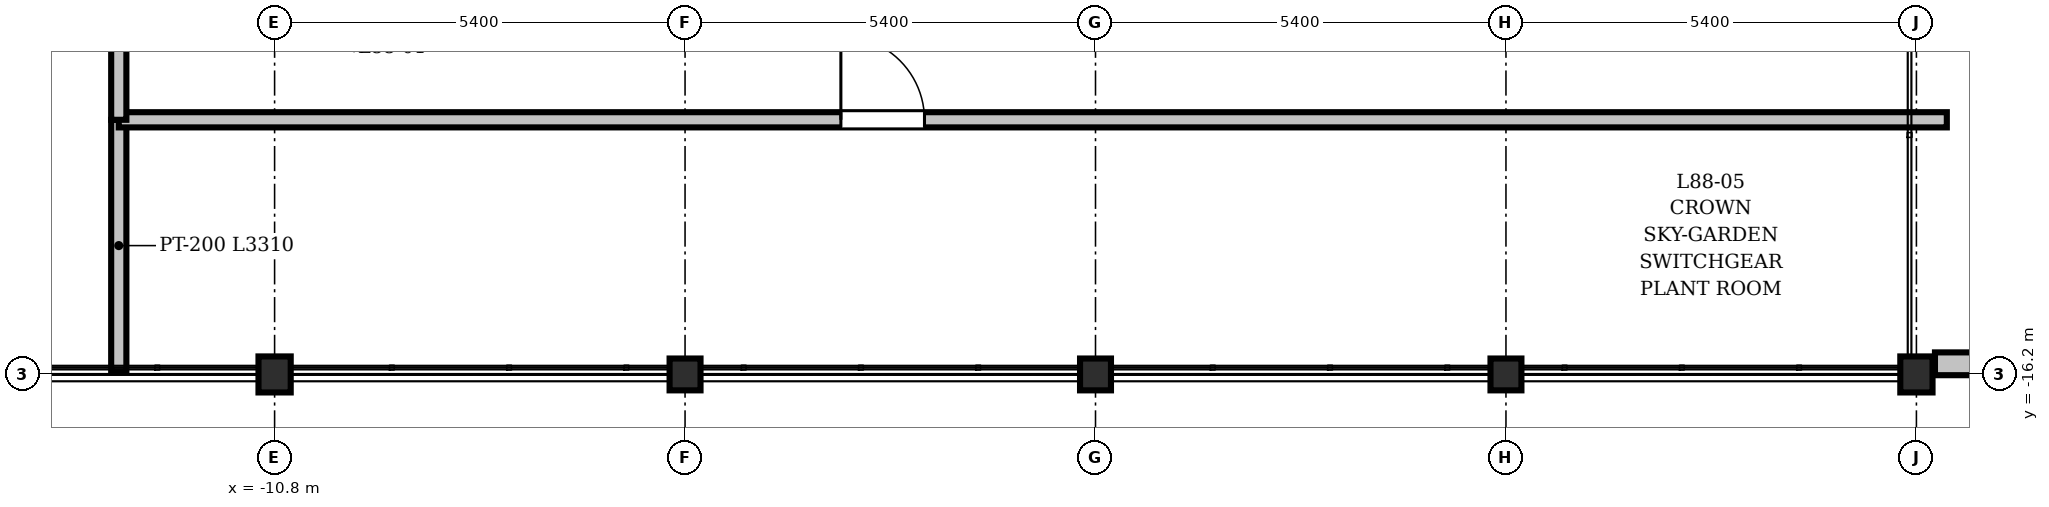
"""IFC4 building model, lengths in metres.
Left out: names, types, materials, properties, quantities, classifications, styles, units other than length and angle.
Written with IfcOpenShell. Run it as: python <this file> out.ifc"""

import sys

from ifc_helpers import new_model, si_unit, direction, frame, frame_2d, origin, origin_2d, place, context, subcontext, project, spatial, rectangle, i_section, extrude, element, fill, save


model = new_model("IFC4")
c1 = context("Model", 3, precision=1e-05, world=origin(), true_north=direction((0.0, 1.0)))
c2 = subcontext(c1, "Body", "Model", "MODEL_VIEW")
j1 = project(units=[si_unit("LENGTHUNIT", "METRE"), si_unit("PLANEANGLEUNIT", "RADIAN")], contexts=[c1])
p1 = place(None, origin())
s1 = spatial("IfcSite", under=j1, at=p1, CompositionType="ELEMENT")
p2 = place(p1, origin())
s2 = spatial("IfcBuilding", under=s1, at=p2, CompositionType="ELEMENT")
p3 = place(p2, frame((0.0, 0.0, 337.5)))
s3 = spatial("IfcBuildingStorey", under=s2, at=p3, CompositionType="ELEMENT", Elevation=337.5)
p4 = place(p3, frame((-10.8, -16.2, 0.0), z_axis=(0.0, 0.0, 1.0), x_axis=(1.0, 0.0, 0.0)))
e1 = element("IfcColumn", 1, at=p4, inside=s3, PredefinedType="COLUMN", context=c2, shape_type="SweptSolid", body=[
    extrude(i_section(OverallWidth=0.424, OverallDepth=0.474, WebThickness=0.043, FlangeThickness=0.065, at=origin_2d()), origin(), (0.0, 0.0, 1.0), 4.5),
])
for number, where, z_axis, x_axis in (
    (2, (-5.4, -16.2, 0.0), (0.0, 0.0, 1.0), (1.0, 0.0, 0.0)),
    (3, (0.0, -16.2, 0.0), (0.0, 0.0, 1.0), (1.0, 0.0, 0.0)),
    (4, (5.4, -16.2, 0.0), (0.0, 0.0, 1.0), (1.0, 0.0, 0.0)),
):
    element("IfcColumn", number, at=place(p3, frame(where, z_axis=z_axis, x_axis=x_axis)), inside=s3, PredefinedType="COLUMN", context=c2, shape_type="SweptSolid", body=[
        extrude(i_section(OverallWidth=0.407, OverallDepth=0.419, WebThickness=0.031, FlangeThickness=0.049, at=origin_2d()), origin(), (0.0, 0.0, 1.0), 4.5),
    ])
p5 = place(p3, frame((10.8, -16.2, 0.0), z_axis=(0.0, 0.0, 1.0), x_axis=(1.0, 0.0, 0.0)))
e5 = element("IfcColumn", 5, at=p5, inside=s3, PredefinedType="COLUMN", context=c2, shape_type="SweptSolid", body=[
    extrude(i_section(OverallWidth=0.424, OverallDepth=0.474, WebThickness=0.043, FlangeThickness=0.065, at=origin_2d()), origin(), (0.0, 0.0, 1.0), 4.5),
])
p6 = place(p3, frame((11.044, -16.06, 0.0), z_axis=(0.0, 0.0, 1.0), x_axis=(1.0, 0.0, 0.0)))
e6 = element("IfcWall", 6, at=p6, inside=s3, PredefinedType="STANDARD", context=c2, shape_type="SweptSolid", body=[
    extrude(rectangle(XDim=3.916, YDim=0.3, at=frame_2d((1.958, 0.0))), origin(), (0.0, 0.0, 1.0), 3.507),
])
p7 = place(p6, frame((1.433, 0.0, 0.75)))
e7 = element("IfcOpeningElement", 7, at=p7, cuts=e6, PredefinedType="OPENING", context=c2, shape_type="SweptSolid", body=[
    extrude(rectangle(XDim=1.05, YDim=1.5, at=frame_2d((0.525, 0.75))), frame((0.0, 0.16, 0.0), z_axis=(0.0, -1.0, 0.0), x_axis=(1.0, 0.0, 0.0)), (0.0, 0.0, 1.0), 0.32),
])
p8 = place(p3, frame((-12.85, -16.16, 0.0), z_axis=(0.0, 0.0, 1.0), x_axis=(0.0, 1.0, 0.0)))
e8 = element("IfcWall", 8, at=p8, inside=s3, PredefinedType="PARTITIONING", context=c2, shape_type="SweptSolid", body=[
    extrude(rectangle(XDim=3.31, YDim=0.2, at=frame_2d((1.655, 0.0))), origin(), (0.0, 0.0, 1.0), 3.507),
])
p9 = place(p3, frame((-12.85, -12.85, 0.0), z_axis=(0.0, 0.0, 1.0), x_axis=(1.0, 0.0, 0.0)))
e9 = element("IfcWall", 9, at=p9, inside=s3, PredefinedType="PARTITIONING", context=c2, shape_type="SweptSolid", body=[
    extrude(rectangle(XDim=24.05, YDim=0.2, at=frame_2d((12.025, 0.0))), origin(), (0.0, 0.0, 1.0), 3.507),
])
p10 = place(p9, frame((9.5, 0.0, 0.0)))
e10 = element("IfcOpeningElement", 10, at=p10, cuts=e9, PredefinedType="OPENING", context=c2, shape_type="SweptSolid", body=[
    extrude(rectangle(XDim=1.1, YDim=2.1, at=frame_2d((0.55, 1.05))), frame((0.0, 0.11, 0.0), z_axis=(0.0, -1.0, 0.0), x_axis=(1.0, 0.0, 0.0)), (0.0, 0.0, 1.0), 0.22),
])
p11 = place(p3, frame((-12.85, -12.85, 0.0), z_axis=(0.0, 0.0, 1.0), x_axis=(0.0, 1.0, 0.0)))
e11 = element("IfcWall", 11, at=p11, inside=s3, PredefinedType="PARTITIONING", context=c2, shape_type="SweptSolid", body=[
    extrude(rectangle(XDim=25.7, YDim=0.2, at=frame_2d((12.85, 0.0))), origin(), (0.0, 0.0, 1.0), 3.663),
])
p12 = place(p11, frame((16.5, 0.0, 0.0)))
e12 = element("IfcOpeningElement", 12, at=p12, cuts=e11, PredefinedType="OPENING", context=c2, shape_type="SweptSolid", body=[
    extrude(rectangle(XDim=1.1, YDim=2.1, at=frame_2d((0.55, 1.05))), frame((0.0, 0.11, 0.0), z_axis=(0.0, -1.0, 0.0), x_axis=(1.0, 0.0, 0.0)), (0.0, 0.0, 1.0), 0.22),
])
p13 = place(p11, frame((3.2, 0.0, 0.0)))
e13 = element("IfcOpeningElement", 13, at=p13, cuts=e11, PredefinedType="OPENING", context=c2, shape_type="SweptSolid", body=[
    extrude(rectangle(XDim=1.1, YDim=2.1, at=frame_2d((0.55, 1.05))), frame((0.0, 0.11, 0.0), z_axis=(0.0, -1.0, 0.0), x_axis=(1.0, 0.0, 0.0)), (0.0, 0.0, 1.0), 0.22),
])
p14 = place(p10, origin())
e14 = element("IfcDoor", 14, at=p14, inside=s3, OperationType="SINGLE_SWING_LEFT", PredefinedType="DOOR", context=c2, shape_type="SweptSolid", body=[
    extrude(rectangle(XDim=1.1, YDim=2.1, at=frame_2d((0.55, 1.05))), frame((0.0, 0.025, 0.0), z_axis=(0.0, -1.0, 0.0), x_axis=(1.0, 0.0, 0.0)), (0.0, 0.0, 1.0), 0.05),
])
fill(e10, e14)
save(model, sys.argv[1])
